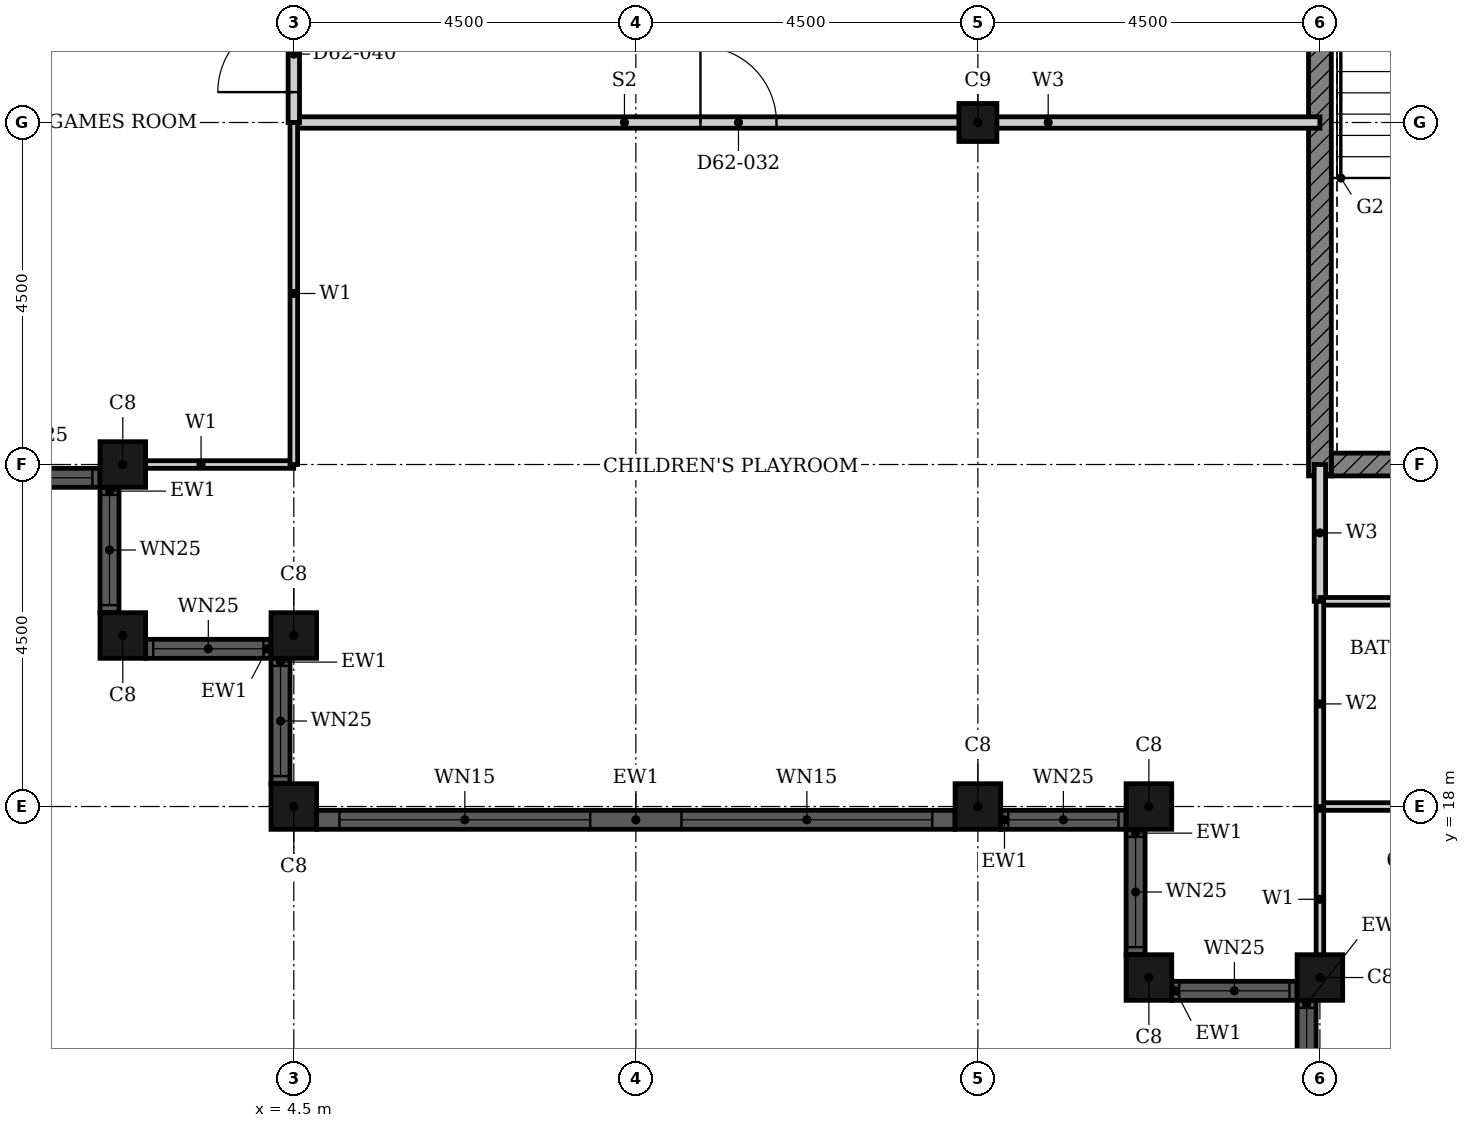
"""IFC4 building model, lengths in metres.
Left out: names, types, materials, properties, quantities, classifications, styles, units other than length and angle.
Written with IfcOpenShell. Run it as: python <this file> out.ifc"""

import sys

from ifc_helpers import new_model, si_unit, direction, frame, frame_2d, origin, origin_2d, place, context, subcontext, project, spatial, rectangle, hollow_rectangle, extrude, element, fill, save


model = new_model("IFC4")
c1 = context("Model", 3, precision=1e-05, world=origin(), true_north=direction((0.0, 1.0)))
c2 = subcontext(c1, "Body", "Model", "MODEL_VIEW")
j1 = project(units=[si_unit("LENGTHUNIT", "METRE"), si_unit("PLANEANGLEUNIT", "RADIAN")], contexts=[c1])
p1 = place(None, origin())
s1 = spatial("IfcSite", under=j1, at=p1, CompositionType="ELEMENT")
p2 = place(p1, origin())
s2 = spatial("IfcBuilding", under=s1, at=p2, CompositionType="ELEMENT")
p3 = place(p2, frame((0.0, 0.0, 245.3)))
s3 = spatial("IfcBuildingStorey", under=s2, at=p3, CompositionType="ELEMENT", Elevation=245.3)
for number, where, z_axis, x_axis in (
    (1, (15.75, 18.0, 0.0), (0.0, 0.0, 1.0), (1.0, 0.0, 0.0)),
    (2, (15.75, 15.75, 0.0), (0.0, 0.0, 1.0), (1.0, 0.0, 0.0)),
    (3, (18.0, 15.75, 0.0), (0.0, 0.0, 1.0), (1.0, 0.0, 0.0)),
    (4, (2.25, 22.5, 0.0), (0.0, 0.0, 1.0), (1.0, 0.0, 0.0)),
    (5, (2.25, 20.25, 0.0), (0.0, 0.0, 1.0), (1.0, 0.0, 0.0)),
    (6, (4.5, 20.25, 0.0), (0.0, 0.0, 1.0), (1.0, 0.0, 0.0)),
    (7, (4.5, 18.0, 0.0), (0.0, 0.0, 1.0), (1.0, 0.0, 0.0)),
    (8, (13.5, 18.0, 0.0), (0.0, 0.0, 1.0), (1.0, 0.0, 0.0)),
):
    element("IfcColumn", number, at=place(p3, frame(where, z_axis=z_axis, x_axis=x_axis)), inside=s3, PredefinedType="COLUMN", context=c2, shape_type="SweptSolid", body=[
        extrude(hollow_rectangle(XDim=0.6, YDim=0.6, WallThickness=0.02, at=origin_2d()), origin(), (0.0, 0.0, 1.0), 3.7),
    ])
p4 = place(p3, frame((13.5, 27.0, 0.0), z_axis=(0.0, 0.0, 1.0), x_axis=(1.0, 0.0, 0.0)))
e9 = element("IfcColumn", 9, at=p4, inside=s3, PredefinedType="COLUMN", context=c2, shape_type="SweptSolid", body=[
    extrude(hollow_rectangle(XDim=0.5, YDim=0.5, WallThickness=0.016, InnerFilletRadius=0.032, OuterFilletRadius=0.048, at=origin_2d()), origin(), (0.0, 0.0, 1.0), 3.7),
])
p5 = place(p3, frame((15.575, 17.7, 0.0), z_axis=(0.0, 0.0, 1.0), x_axis=(0.0, -1.0, 0.0)))
e10 = element("IfcWall", 10, at=p5, inside=s3, PredefinedType="SOLIDWALL", context=c2, shape_type="SweptSolid", body=[
    extrude(rectangle(XDim=1.65, YDim=0.25, at=frame_2d((0.825, 0.0))), origin(), (0.0, 0.0, 1.0), 3.7),
])
p6 = place(p5, frame((0.1, 0.0, 0.9)))
e11 = element("IfcOpeningElement", 11, at=p6, cuts=e10, PredefinedType="OPENING", context=c2, shape_type="SweptSolid", body=[
    extrude(rectangle(XDim=1.45, YDim=1.85, at=frame_2d((0.725, 0.925))), frame((0.0, 0.135, 0.0), z_axis=(0.0, -1.0, 0.0), x_axis=(1.0, 0.0, 0.0)), (0.0, 0.0, 1.0), 0.27),
])
p7 = place(p3, frame((16.05, 15.575, 0.0), z_axis=(0.0, 0.0, 1.0), x_axis=(1.0, 0.0, 0.0)))
e12 = element("IfcWall", 12, at=p7, inside=s3, PredefinedType="SOLIDWALL", context=c2, shape_type="SweptSolid", body=[
    extrude(rectangle(XDim=1.65, YDim=0.25, at=frame_2d((0.825, 0.0))), origin(), (0.0, 0.0, 1.0), 3.7),
])
p8 = place(p7, frame((0.1, 0.0, 0.9)))
e13 = element("IfcOpeningElement", 13, at=p8, cuts=e12, PredefinedType="OPENING", context=c2, shape_type="SweptSolid", body=[
    extrude(rectangle(XDim=1.45, YDim=1.85, at=frame_2d((0.725, 0.925))), frame((0.0, 0.135, 0.0), z_axis=(0.0, -1.0, 0.0), x_axis=(1.0, 0.0, 0.0)), (0.0, 0.0, 1.0), 0.27),
])
p9 = place(p3, frame((17.825, 15.45, 0.0), z_axis=(0.0, 0.0, 1.0), x_axis=(0.0, -1.0, 0.0)))
e14 = element("IfcWall", 14, at=p9, inside=s3, PredefinedType="SOLIDWALL", context=c2, shape_type="SweptSolid", body=[
    extrude(rectangle(XDim=1.65, YDim=0.25, at=frame_2d((0.825, 0.0))), origin(), (0.0, 0.0, 1.0), 3.7),
])
p10 = place(p9, frame((0.1, 0.0, 0.9)))
e15 = element("IfcOpeningElement", 15, at=p10, cuts=e14, PredefinedType="OPENING", context=c2, shape_type="SweptSolid", body=[
    extrude(rectangle(XDim=1.45, YDim=1.85, at=frame_2d((0.725, 0.925))), frame((0.0, 0.135, 0.0), z_axis=(0.0, -1.0, 0.0), x_axis=(1.0, 0.0, 0.0)), (0.0, 0.0, 1.0), 0.27),
])
p11 = place(p3, frame((0.3, 22.325, 0.0), z_axis=(0.0, 0.0, 1.0), x_axis=(1.0, 0.0, 0.0)))
e16 = element("IfcWall", 16, at=p11, inside=s3, PredefinedType="SOLIDWALL", context=c2, shape_type="SweptSolid", body=[
    extrude(rectangle(XDim=1.65, YDim=0.25, at=frame_2d((0.825, 0.0))), origin(), (0.0, 0.0, 1.0), 3.7),
])
p12 = place(p11, frame((0.1, 0.0, 0.9)))
e17 = element("IfcOpeningElement", 17, at=p12, cuts=e16, PredefinedType="OPENING", context=c2, shape_type="SweptSolid", body=[
    extrude(rectangle(XDim=1.45, YDim=1.85, at=frame_2d((0.725, 0.925))), frame((0.0, 0.135, 0.0), z_axis=(0.0, -1.0, 0.0), x_axis=(1.0, 0.0, 0.0)), (0.0, 0.0, 1.0), 0.27),
])
p13 = place(p3, frame((2.075, 22.2, 0.0), z_axis=(0.0, 0.0, 1.0), x_axis=(0.0, -1.0, 0.0)))
e18 = element("IfcWall", 18, at=p13, inside=s3, PredefinedType="SOLIDWALL", context=c2, shape_type="SweptSolid", body=[
    extrude(rectangle(XDim=1.65, YDim=0.25, at=frame_2d((0.825, 0.0))), origin(), (0.0, 0.0, 1.0), 3.7),
])
p14 = place(p13, frame((0.1, 0.0, 0.9)))
e19 = element("IfcOpeningElement", 19, at=p14, cuts=e18, PredefinedType="OPENING", context=c2, shape_type="SweptSolid", body=[
    extrude(rectangle(XDim=1.45, YDim=1.85, at=frame_2d((0.725, 0.925))), frame((0.0, 0.135, 0.0), z_axis=(0.0, -1.0, 0.0), x_axis=(1.0, 0.0, 0.0)), (0.0, 0.0, 1.0), 0.27),
])
p15 = place(p3, frame((2.55, 20.075, 0.0), z_axis=(0.0, 0.0, 1.0), x_axis=(1.0, 0.0, 0.0)))
e20 = element("IfcWall", 20, at=p15, inside=s3, PredefinedType="SOLIDWALL", context=c2, shape_type="SweptSolid", body=[
    extrude(rectangle(XDim=1.65, YDim=0.25, at=frame_2d((0.825, 0.0))), origin(), (0.0, 0.0, 1.0), 3.7),
])
p16 = place(p15, frame((0.1, 0.0, 0.9)))
e21 = element("IfcOpeningElement", 21, at=p16, cuts=e20, PredefinedType="OPENING", context=c2, shape_type="SweptSolid", body=[
    extrude(rectangle(XDim=1.45, YDim=1.85, at=frame_2d((0.725, 0.925))), frame((0.0, 0.135, 0.0), z_axis=(0.0, -1.0, 0.0), x_axis=(1.0, 0.0, 0.0)), (0.0, 0.0, 1.0), 0.27),
])
p17 = place(p3, frame((4.325, 19.95, 0.0), z_axis=(0.0, 0.0, 1.0), x_axis=(0.0, -1.0, 0.0)))
e22 = element("IfcWall", 22, at=p17, inside=s3, PredefinedType="SOLIDWALL", context=c2, shape_type="SweptSolid", body=[
    extrude(rectangle(XDim=1.65, YDim=0.25, at=frame_2d((0.825, 0.0))), origin(), (0.0, 0.0, 1.0), 3.7),
])
p18 = place(p17, frame((0.1, 0.0, 0.9)))
e23 = element("IfcOpeningElement", 23, at=p18, cuts=e22, PredefinedType="OPENING", context=c2, shape_type="SweptSolid", body=[
    extrude(rectangle(XDim=1.45, YDim=1.85, at=frame_2d((0.725, 0.925))), frame((0.0, 0.135, 0.0), z_axis=(0.0, -1.0, 0.0), x_axis=(1.0, 0.0, 0.0)), (0.0, 0.0, 1.0), 0.27),
])
p19 = place(p3, frame((4.8, 17.825, 0.0), z_axis=(0.0, 0.0, 1.0), x_axis=(1.0, 0.0, 0.0)))
e24 = element("IfcWall", 24, at=p19, inside=s3, PredefinedType="SOLIDWALL", context=c2, shape_type="SweptSolid", body=[
    extrude(rectangle(XDim=8.4, YDim=0.25, at=frame_2d((4.2, 0.0))), origin(), (0.0, 0.0, 1.0), 3.7),
])
p20 = place(p19, frame((0.3, 0.0, 0.45)))
e25 = element("IfcOpeningElement", 25, at=p20, cuts=e24, PredefinedType="OPENING", context=c2, shape_type="SweptSolid", body=[
    extrude(rectangle(XDim=3.3, YDim=2.3, at=frame_2d((1.65, 1.15))), frame((0.0, 0.135, 0.0), z_axis=(0.0, -1.0, 0.0), x_axis=(1.0, 0.0, 0.0)), (0.0, 0.0, 1.0), 0.27),
])
p21 = place(p19, frame((4.8, 0.0, 0.45)))
e26 = element("IfcOpeningElement", 26, at=p21, cuts=e24, PredefinedType="OPENING", context=c2, shape_type="SweptSolid", body=[
    extrude(rectangle(XDim=3.3, YDim=2.3, at=frame_2d((1.65, 1.15))), frame((0.0, 0.135, 0.0), z_axis=(0.0, -1.0, 0.0), x_axis=(1.0, 0.0, 0.0)), (0.0, 0.0, 1.0), 0.27),
])
p22 = place(p3, frame((13.8, 17.825, 0.0), z_axis=(0.0, 0.0, 1.0), x_axis=(1.0, 0.0, 0.0)))
e27 = element("IfcWall", 27, at=p22, inside=s3, PredefinedType="SOLIDWALL", context=c2, shape_type="SweptSolid", body=[
    extrude(rectangle(XDim=1.65, YDim=0.25, at=frame_2d((0.825, 0.0))), origin(), (0.0, 0.0, 1.0), 3.7),
])
p23 = place(p22, frame((0.1, 0.0, 0.9)))
e28 = element("IfcOpeningElement", 28, at=p23, cuts=e27, PredefinedType="OPENING", context=c2, shape_type="SweptSolid", body=[
    extrude(rectangle(XDim=1.45, YDim=1.85, at=frame_2d((0.725, 0.925))), frame((0.0, 0.135, 0.0), z_axis=(0.0, -1.0, 0.0), x_axis=(1.0, 0.0, 0.0)), (0.0, 0.0, 1.0), 0.27),
])
p24 = place(p3, frame((18.15, 22.5, 0.0), z_axis=(0.0, 0.0, 1.0), x_axis=(1.0, 0.0, 0.0)))
e29 = element("IfcWall", 29, at=p24, inside=s3, PredefinedType="SHEAR", context=c2, shape_type="SweptSolid", body=[
    extrude(rectangle(XDim=4.225, YDim=0.3, at=frame_2d((2.113, 0.0))), origin(), (0.0, 0.0, 1.0), 3.4),
])
p25 = place(p3, frame((18.0, 22.35, 0.0), z_axis=(0.0, 0.0, 1.0), x_axis=(0.0, 1.0, 0.0)))
e30 = element("IfcWall", 30, at=p25, inside=s3, PredefinedType="SHEAR", context=c2, shape_type="SweptSolid", body=[
    extrude(rectangle(XDim=9.3, YDim=0.3, at=frame_2d((4.65, 0.0))), origin(), (0.0, 0.0, 1.0), 3.4),
])
p26 = place(p3, frame((4.5, 27.0, 0.0), z_axis=(0.0, 0.0, 1.0), x_axis=(1.0, 0.0, 0.0)))
e31 = element("IfcWall", 31, at=p26, inside=s3, PredefinedType="PARTITIONING", context=c2, shape_type="SweptSolid", body=[
    extrude(rectangle(XDim=13.5, YDim=0.15, at=frame_2d((6.75, 0.0))), origin(), (0.0, 0.0, 1.0), 2.68),
])
p27 = place(p26, frame((5.35, 0.0, 0.0)))
e32 = element("IfcOpeningElement", 32, at=p27, cuts=e31, PredefinedType="OPENING", context=c2, shape_type="SweptSolid", body=[
    extrude(rectangle(XDim=1.0, YDim=2.1, at=frame_2d((0.5, 1.05))), frame((0.0, 0.085, 0.0), z_axis=(0.0, -1.0, 0.0), x_axis=(1.0, 0.0, 0.0)), (0.0, 0.0, 1.0), 0.17),
])
p28 = place(p3, frame((18.0, 20.7, 0.0), z_axis=(0.0, 0.0, 1.0), x_axis=(0.0, 1.0, 0.0)))
e33 = element("IfcWall", 33, at=p28, inside=s3, PredefinedType="PARTITIONING", context=c2, shape_type="SweptSolid", body=[
    extrude(rectangle(XDim=1.8, YDim=0.15, at=frame_2d((0.9, 0.0))), origin(), (0.0, 0.0, 1.0), 3.4),
])
p29 = place(p3, frame((4.5, 27.0, 0.0), z_axis=(0.0, 0.0, 1.0), x_axis=(0.0, 1.0, 0.0)))
e34 = element("IfcWall", 34, at=p29, inside=s3, PredefinedType="PARTITIONING", context=c2, shape_type="SweptSolid", body=[
    extrude(rectangle(XDim=1.8, YDim=0.15, at=frame_2d((0.9, 0.0))), origin(), (0.0, 0.0, 1.0), 3.4),
])
p30 = place(p29, frame((0.4, 0.0, 0.0)))
e35 = element("IfcOpeningElement", 35, at=p30, cuts=e34, PredefinedType="OPENING", context=c2, shape_type="SweptSolid", body=[
    extrude(rectangle(XDim=1.0, YDim=2.1, at=frame_2d((0.5, 1.05))), frame((0.0, 0.085, 0.0), z_axis=(0.0, -1.0, 0.0), x_axis=(1.0, 0.0, 0.0)), (0.0, 0.0, 1.0), 0.17),
])
p31 = place(p3, frame((2.06, 22.5, 0.0), z_axis=(0.0, 0.0, 1.0), x_axis=(1.0, 0.0, 0.0)))
e36 = element("IfcWall", 36, at=p31, inside=s3, PredefinedType="PARTITIONING", context=c2, shape_type="SweptSolid", body=[
    extrude(rectangle(XDim=2.439, YDim=0.1, at=frame_2d((1.219, 0.0))), origin(), (0.0, 0.0, 1.0), 2.68),
])
p32 = place(p3, frame((18.0, 15.56, 0.0), z_axis=(0.0, 0.0, 1.0), x_axis=(0.0, 1.0, 0.0)))
e37 = element("IfcWall", 37, at=p32, inside=s3, PredefinedType="PARTITIONING", context=c2, shape_type="SweptSolid", body=[
    extrude(rectangle(XDim=2.439, YDim=0.1, at=frame_2d((1.219, 0.0))), origin(), (0.0, 0.0, 1.0), 3.4),
])
p33 = place(p3, frame((4.5, 22.5, 0.0), z_axis=(0.0, 0.0, 1.0), x_axis=(0.0, 1.0, 0.0)))
e38 = element("IfcWall", 38, at=p33, inside=s3, PredefinedType="PARTITIONING", context=c2, shape_type="SweptSolid", body=[
    extrude(rectangle(XDim=4.5, YDim=0.1, at=frame_2d((2.25, 0.0))), origin(), (0.0, 0.0, 1.0), 3.4),
])
for number, where, z_axis, x_axis in (
    (39, (18.0, 18.0, 0.0), (0.0, 0.0, 1.0), (1.0, 0.0, 0.0)),
    (40, (18.0, 20.7, 0.0), (0.0, 0.0, 1.0), (1.0, 0.0, 0.0)),
):
    element("IfcWall", number, at=place(p3, frame(where, z_axis=z_axis, x_axis=x_axis)), inside=s3, PredefinedType="PARTITIONING", context=c2, shape_type="SweptSolid", body=[
        extrude(rectangle(XDim=2.4, YDim=0.1, at=frame_2d((1.2, 0.0))), origin(), (0.0, 0.0, 1.0), 3.4),
    ])
p34 = place(p3, frame((18.0, 18.0, 0.0), z_axis=(0.0, 0.0, 1.0), x_axis=(0.0, 1.0, 0.0)))
e41 = element("IfcWall", 41, at=p34, inside=s3, PredefinedType="PARTITIONING", context=c2, shape_type="SweptSolid", body=[
    extrude(rectangle(XDim=2.7, YDim=0.1, at=frame_2d((1.35, 0.0))), origin(), (0.0, 0.0, 1.0), 3.4),
])
p35 = place(p6, origin())
e42 = element("IfcWindow", 42, at=p35, inside=s3, PartitioningType="SINGLE_PANEL", PredefinedType="WINDOW", context=c2, shape_type="SweptSolid", body=[
    extrude(rectangle(XDim=1.45, YDim=1.85, at=frame_2d((0.725, 0.925))), frame((0.0, 0.03, 0.0), z_axis=(0.0, -1.0, 0.0), x_axis=(1.0, 0.0, 0.0)), (0.0, 0.0, 1.0), 0.06),
])
fill(e11, e42)
p36 = place(p8, origin())
e43 = element("IfcWindow", 43, at=p36, inside=s3, PartitioningType="SINGLE_PANEL", PredefinedType="WINDOW", context=c2, shape_type="SweptSolid", body=[
    extrude(rectangle(XDim=1.45, YDim=1.85, at=frame_2d((0.725, 0.925))), frame((0.0, 0.03, 0.0), z_axis=(0.0, -1.0, 0.0), x_axis=(1.0, 0.0, 0.0)), (0.0, 0.0, 1.0), 0.06),
])
fill(e13, e43)
p37 = place(p10, origin())
e44 = element("IfcWindow", 44, at=p37, inside=s3, PartitioningType="SINGLE_PANEL", PredefinedType="WINDOW", context=c2, shape_type="SweptSolid", body=[
    extrude(rectangle(XDim=1.45, YDim=1.85, at=frame_2d((0.725, 0.925))), frame((0.0, 0.03, 0.0), z_axis=(0.0, -1.0, 0.0), x_axis=(1.0, 0.0, 0.0)), (0.0, 0.0, 1.0), 0.06),
])
fill(e15, e44)
p38 = place(p12, origin())
e45 = element("IfcWindow", 45, at=p38, inside=s3, PartitioningType="SINGLE_PANEL", PredefinedType="WINDOW", context=c2, shape_type="SweptSolid", body=[
    extrude(rectangle(XDim=1.45, YDim=1.85, at=frame_2d((0.725, 0.925))), frame((0.0, 0.03, 0.0), z_axis=(0.0, -1.0, 0.0), x_axis=(1.0, 0.0, 0.0)), (0.0, 0.0, 1.0), 0.06),
])
fill(e17, e45)
p39 = place(p14, origin())
e46 = element("IfcWindow", 46, at=p39, inside=s3, PartitioningType="SINGLE_PANEL", PredefinedType="WINDOW", context=c2, shape_type="SweptSolid", body=[
    extrude(rectangle(XDim=1.45, YDim=1.85, at=frame_2d((0.725, 0.925))), frame((0.0, 0.03, 0.0), z_axis=(0.0, -1.0, 0.0), x_axis=(1.0, 0.0, 0.0)), (0.0, 0.0, 1.0), 0.06),
])
fill(e19, e46)
p40 = place(p16, origin())
e47 = element("IfcWindow", 47, at=p40, inside=s3, PartitioningType="SINGLE_PANEL", PredefinedType="WINDOW", context=c2, shape_type="SweptSolid", body=[
    extrude(rectangle(XDim=1.45, YDim=1.85, at=frame_2d((0.725, 0.925))), frame((0.0, 0.03, 0.0), z_axis=(0.0, -1.0, 0.0), x_axis=(1.0, 0.0, 0.0)), (0.0, 0.0, 1.0), 0.06),
])
fill(e21, e47)
p41 = place(p18, origin())
e48 = element("IfcWindow", 48, at=p41, inside=s3, PartitioningType="SINGLE_PANEL", PredefinedType="WINDOW", context=c2, shape_type="SweptSolid", body=[
    extrude(rectangle(XDim=1.45, YDim=1.85, at=frame_2d((0.725, 0.925))), frame((0.0, 0.03, 0.0), z_axis=(0.0, -1.0, 0.0), x_axis=(1.0, 0.0, 0.0)), (0.0, 0.0, 1.0), 0.06),
])
fill(e23, e48)
p42 = place(p20, origin())
e49 = element("IfcWindow", 49, at=p42, inside=s3, PartitioningType="SINGLE_PANEL", PredefinedType="WINDOW", context=c2, shape_type="SweptSolid", body=[
    extrude(rectangle(XDim=3.3, YDim=2.3, at=frame_2d((1.65, 1.15))), frame((0.0, 0.03, 0.0), z_axis=(0.0, -1.0, 0.0), x_axis=(1.0, 0.0, 0.0)), (0.0, 0.0, 1.0), 0.06),
])
fill(e25, e49)
p43 = place(p21, origin())
e50 = element("IfcWindow", 50, at=p43, inside=s3, PartitioningType="SINGLE_PANEL", PredefinedType="WINDOW", context=c2, shape_type="SweptSolid", body=[
    extrude(rectangle(XDim=3.3, YDim=2.3, at=frame_2d((1.65, 1.15))), frame((0.0, 0.03, 0.0), z_axis=(0.0, -1.0, 0.0), x_axis=(1.0, 0.0, 0.0)), (0.0, 0.0, 1.0), 0.06),
])
fill(e26, e50)
p44 = place(p23, origin())
e51 = element("IfcWindow", 51, at=p44, inside=s3, PartitioningType="SINGLE_PANEL", PredefinedType="WINDOW", context=c2, shape_type="SweptSolid", body=[
    extrude(rectangle(XDim=1.45, YDim=1.85, at=frame_2d((0.725, 0.925))), frame((0.0, 0.03, 0.0), z_axis=(0.0, -1.0, 0.0), x_axis=(1.0, 0.0, 0.0)), (0.0, 0.0, 1.0), 0.06),
])
fill(e28, e51)
p45 = place(p27, origin())
e52 = element("IfcDoor", 52, at=p45, inside=s3, OperationType="SINGLE_SWING_LEFT", PredefinedType="DOOR", context=c2, shape_type="SweptSolid", body=[
    extrude(rectangle(XDim=1.0, YDim=2.1, at=frame_2d((0.5, 1.05))), frame((0.0, 0.025, 0.0), z_axis=(0.0, -1.0, 0.0), x_axis=(1.0, 0.0, 0.0)), (0.0, 0.0, 1.0), 0.05),
])
fill(e32, e52)
p46 = place(p30, origin())
e53 = element("IfcDoor", 53, at=p46, inside=s3, OperationType="SINGLE_SWING_RIGHT", PredefinedType="DOOR", context=c2, shape_type="SweptSolid", body=[
    extrude(rectangle(XDim=1.0, YDim=2.1, at=frame_2d((0.5, 1.05))), frame((0.0, 0.025, 0.0), z_axis=(0.0, -1.0, 0.0), x_axis=(1.0, 0.0, 0.0)), (0.0, 0.0, 1.0), 0.05),
])
fill(e35, e53)
save(model, sys.argv[1])
